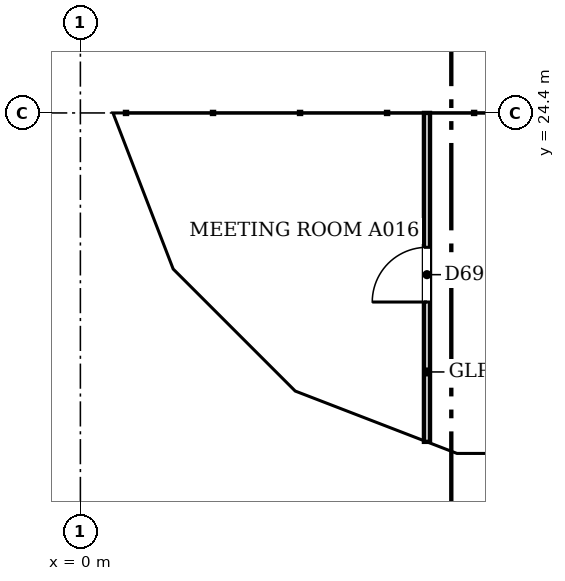
"""IFC4 building model, lengths in metres.
Left out: names, types, materials, properties, quantities, classifications, styles, units other than length and angle.
Written with IfcOpenShell. Run it as: python <this file> out.ifc"""

import sys

from ifc_helpers import new_model, si_unit, direction, frame, frame_2d, origin, place, context, subcontext, project, spatial, polyline, rectangle, outline, extrude, faceted_brep, source, transform, mapped, element, fill, save


model = new_model("IFC4")
c1 = context("Model", 3, precision=1e-05, world=origin(), true_north=direction((0.0, 1.0)))
c2 = subcontext(c1, "Body", "Model", "MODEL_VIEW")
j1 = project(units=[si_unit("LENGTHUNIT", "METRE"), si_unit("PLANEANGLEUNIT", "RADIAN")], contexts=[c1])
p1 = place(None, origin())
s1 = spatial("IfcSite", under=j1, at=p1, CompositionType="ELEMENT")
p2 = place(p1, origin())
s2 = spatial("IfcBuilding", under=s1, at=p2, CompositionType="ELEMENT")
p3 = place(p2, frame((0.0, 0.0, 185.8)))
s3 = spatial("IfcBuildingStorey", under=s2, at=p3, CompositionType="ELEMENT", Elevation=185.8)
m1 = source(origin(), c2, "Body", "Brep", [
    faceted_brep([(3.05, -0.25, 0.0), (6.053, -0.25, 3.8), (3.05, -0.25, 7.6), (0.0, -0.25, 3.8), (0.0, 0.25, 3.8), (3.05, 0.25, 7.6), (6.007, 0.25, 3.859), (6.007, 0.25, 3.741), (3.05, 0.25, 0.0), (6.053, 0.0, 3.8)], [[[0, 1, 2, 3]], [[4, 5, 6, 7, 8]], [[8, 7, 9, 1, 0]], [[6, 5, 2, 1, 9]], [[5, 4, 3, 2]], [[4, 8, 0, 3]], [[9, 7, 6]]]),
])
p4 = place(p3, frame((0.25, 30.5, -3.8), z_axis=(0.0, 0.0, 1.0), x_axis=(0.0, -1.0, 0.0)))
e1 = element("IfcWall", 1, at=p4, inside=s3, PredefinedType="SOLIDWALL", context=c2, shape_type="MappedRepresentation", body=[
    mapped(m1, transform((0.0, 0.0, 0.0), scale=1.0)),
])
m2 = source(origin(), c2, "Body", "SweptSolid", [
    extrude(outline(polyline([(3.049, 0.401), (5.735, 3.8), (3.049, 7.199), (0.321, 3.8), (3.049, 0.401)])), frame((0.0, 0.26, 0.0), z_axis=(0.0, -1.0, 0.0), x_axis=(1.0, 0.0, 0.0)), (0.0, 0.0, 1.0), 0.52),
])
p5 = place(p4, origin())
e2 = element("IfcOpeningElement", 2, at=p5, cuts=e1, PredefinedType="OPENING", context=c2, shape_type="MappedRepresentation", body=[
    mapped(m2, transform((0.0, 0.0, 0.0), scale=1.0)),
])
m3 = source(origin(), c2, "Body", "Brep", [
    faceted_brep([(2.95, -0.25, 0.0), (3.003, -0.25, 0.068), (3.003, -0.25, 7.532), (2.95, -0.25, 7.6), (0.0, -0.25, 3.8), (0.047, 0.25, 3.86), (2.898, 0.25, 7.532), (2.898, 0.25, 0.068), (0.047, 0.25, 3.74), (2.95, 0.0, 0.0), (2.95, 0.0, 7.6), (0.0, 0.0, 3.8)], [[[0, 1, 2, 3, 4]], [[5, 6, 7, 8]], [[1, 0, 9]], [[10, 3, 2]], [[6, 5, 11, 4, 3, 10]], [[8, 7, 9, 0, 4, 11]], [[8, 11, 5]], [[1, 9, 7, 6, 10, 2]]]),
])
p6 = place(p3, frame((0.25, 24.447, -3.8), z_axis=(0.0, 0.0, 1.0), x_axis=(0.35992665181, -0.932980602862, 0.0)))
e3 = element("IfcWall", 3, at=p6, inside=s3, PredefinedType="SOLIDWALL", context=c2, shape_type="MappedRepresentation", body=[
    mapped(m3, transform((0.0, 0.0, 0.0), scale=1.0)),
])
m4 = source(origin(), c2, "Body", "SweptSolid", [
    extrude(outline(polyline([(2.75, 6.935), (0.316, 3.8), (2.75, 0.665), (2.75, 6.935)])), frame((0.0, 0.26, 0.0), z_axis=(0.0, -1.0, 0.0), x_axis=(1.0, 0.0, 0.0)), (0.0, 0.0, 1.0), 0.52),
])
p7 = place(p6, origin())
e4 = element("IfcOpeningElement", 4, at=p7, cuts=e3, PredefinedType="OPENING", context=c2, shape_type="MappedRepresentation", body=[
    mapped(m4, transform((0.0, 0.0, 0.0), scale=1.0)),
])
m5 = source(origin(), c2, "Body", "Brep", [
    faceted_brep([(0.053, -0.25, 0.0), (2.997, -0.25, 3.8), (0.053, -0.25, 7.6), (0.0, -0.25, 7.532), (0.0, -0.25, 0.068), (0.106, 0.25, 7.532), (2.944, 0.25, 3.868), (2.944, 0.25, 3.732), (0.106, 0.25, 0.068), (2.997, 0.0, 3.8), (0.053, 0.0, 0.0), (0.053, 0.0, 7.6)], [[[0, 1, 2, 3, 4]], [[5, 6, 7, 8]], [[8, 7, 9, 1, 0, 10]], [[6, 5, 11, 2, 1, 9]], [[3, 2, 11]], [[10, 0, 4]], [[8, 10, 4, 3, 11, 5]], [[9, 7, 6]]]),
])
p8 = place(p3, frame((1.274, 21.731, -3.8), z_axis=(0.0, 0.0, 1.0), x_axis=(0.707147509625, -0.707066050402, 0.0)))
e5 = element("IfcWall", 5, at=p8, inside=s3, PredefinedType="SOLIDWALL", context=c2, shape_type="MappedRepresentation", body=[
    mapped(m5, transform((0.0, 0.0, 0.0), scale=1.0)),
])
m6 = source(origin(), c2, "Body", "SweptSolid", [
    extrude(outline(polyline([(0.253, 0.666), (2.681, 3.8), (0.253, 6.934), (0.253, 0.666)])), frame((0.0, 0.26, 0.0), z_axis=(0.0, -1.0, 0.0), x_axis=(1.0, 0.0, 0.0)), (0.0, 0.0, 1.0), 0.52),
])
p9 = place(p8, origin())
e6 = element("IfcOpeningElement", 6, at=p9, cuts=e5, PredefinedType="OPENING", context=c2, shape_type="MappedRepresentation", body=[
    mapped(m6, transform((0.0, 0.0, 0.0), scale=1.0)),
])
m7 = source(origin(), c2, "Body", "Brep", [
    faceted_brep([(2.95, -0.25, 0.0), (2.997, -0.25, 0.059), (2.997, -0.25, 7.541), (2.95, -0.25, 7.6), (0.0, -0.25, 3.8), (0.053, 0.25, 3.868), (2.904, 0.25, 7.54), (2.904, 0.25, 0.06), (0.053, 0.25, 3.732), (2.95, 0.0, 0.0), (2.95, 0.0, 7.6), (0.0, 0.0, 3.8)], [[[0, 1, 2, 3, 4]], [[5, 6, 7, 8]], [[1, 0, 9]], [[10, 3, 2]], [[6, 5, 11, 4, 3, 10]], [[8, 7, 9, 0, 4, 11]], [[8, 11, 5]], [[1, 9, 7, 6, 10, 2]]]),
])
p10 = place(p3, frame((3.394, 19.612, -3.8), z_axis=(0.0, 0.0, 1.0), x_axis=(0.932990326376, -0.359901446078, 0.0)))
e7 = element("IfcWall", 7, at=p10, inside=s3, PredefinedType="SOLIDWALL", context=c2, shape_type="MappedRepresentation", body=[
    mapped(m7, transform((0.0, 0.0, 0.0), scale=1.0)),
])
p11 = place(p10, origin())
e8 = element("IfcOpeningElement", 8, at=p11, cuts=e7, PredefinedType="OPENING", context=c2, shape_type="MappedRepresentation", body=[
    mapped(m4, transform((0.0, 0.0, 0.0), scale=1.0)),
])
m8 = source(origin(), c2, "Body", "Brep", [
    faceted_brep([(0.047, -0.25, 0.0), (3.05, -0.25, 3.8), (0.047, -0.25, 7.6), (0.0, -0.25, 7.54), (0.0, -0.25, 0.06), (0.093, 0.25, 7.541), (3.05, 0.25, 3.8), (0.093, 0.25, 0.059), (0.047, 0.0, 0.0), (0.047, 0.0, 7.6)], [[[0, 1, 2, 3, 4]], [[5, 6, 7]], [[7, 6, 1, 0, 8]], [[6, 5, 9, 2, 1]], [[3, 2, 9]], [[8, 0, 4]], [[7, 8, 4, 3, 9, 5]]]),
])
p12 = place(p3, frame((6.1, 18.55, -3.8), z_axis=(0.0, 0.0, 1.0), x_axis=(1.0, 0.0, 0.0)))
e9 = element("IfcWall", 9, at=p12, inside=s3, PredefinedType="SOLIDWALL", context=c2, shape_type="MappedRepresentation", body=[
    mapped(m8, transform((0.0, 0.0, 0.0), scale=1.0)),
])
m9 = source(origin(), c2, "Body", "SweptSolid", [
    extrude(outline(polyline([(0.247, 0.656), (2.731, 3.8), (0.247, 6.944), (0.247, 0.656)])), frame((0.0, 0.26, 0.0), z_axis=(0.0, -1.0, 0.0), x_axis=(1.0, 0.0, 0.0)), (0.0, 0.0, 1.0), 0.52),
])
p13 = place(p12, origin())
e10 = element("IfcOpeningElement", 10, at=p13, cuts=e9, PredefinedType="OPENING", context=c2, shape_type="MappedRepresentation", body=[
    mapped(m9, transform((0.0, 0.0, 0.0), scale=1.0)),
])
p14 = place(p2, frame((0.0, 0.0, 189.6)))
s4 = spatial("IfcBuildingStorey", under=s2, at=p14, CompositionType="ELEMENT", Elevation=189.6)
m10 = source(origin(), c2, "Body", "Brep", [
    faceted_brep([(3.003, -0.25, 0.0), (3.05, -0.25, 0.06), (3.05, -0.25, 7.54), (3.003, -0.25, 7.6), (0.0, -0.25, 3.8), (0.0, 0.25, 3.8), (2.957, 0.25, 7.541), (2.957, 0.25, 0.059), (3.003, 0.0, 0.0), (3.003, 0.0, 7.6)], [[[0, 1, 2, 3, 4]], [[5, 6, 7]], [[1, 0, 8]], [[9, 3, 2]], [[6, 5, 4, 3, 9]], [[5, 7, 8, 0, 4]], [[1, 8, 7, 6, 9, 2]]]),
])
p15 = place(p14, frame((0.25, 27.45, -3.8), z_axis=(0.0, 0.0, 1.0), x_axis=(0.0, -1.0, 0.0)))
e11 = element("IfcWall", 11, at=p15, inside=s4, PredefinedType="SOLIDWALL", context=c2, shape_type="MappedRepresentation", body=[
    mapped(m10, transform((0.0, 0.0, 0.0), scale=1.0)),
])
m11 = source(origin(), c2, "Body", "SweptSolid", [
    extrude(outline(polyline([(2.803, 6.944), (0.319, 3.8), (2.803, 0.656), (2.803, 6.944)])), frame((0.0, 0.26, 0.0), z_axis=(0.0, -1.0, 0.0), x_axis=(1.0, 0.0, 0.0)), (0.0, 0.0, 1.0), 0.52),
])
p16 = place(p15, origin())
e12 = element("IfcOpeningElement", 12, at=p16, cuts=e11, PredefinedType="OPENING", context=c2, shape_type="MappedRepresentation", body=[
    mapped(m11, transform((0.0, 0.0, 0.0), scale=1.0)),
])
m12 = source(origin(), c2, "Body", "Brep", [
    faceted_brep([(0.047, -0.25, 0.0), (2.997, -0.25, 3.8), (0.047, -0.25, 7.6), (0.0, -0.25, 7.541), (0.0, -0.25, 0.059), (0.093, 0.25, 7.54), (2.944, 0.25, 3.868), (2.944, 0.25, 3.732), (0.093, 0.25, 0.06), (2.997, 0.0, 3.8), (0.047, 0.0, 0.0), (0.047, 0.0, 7.6)], [[[0, 1, 2, 3, 4]], [[5, 6, 7, 8]], [[8, 7, 9, 1, 0, 10]], [[6, 5, 11, 2, 1, 9]], [[3, 2, 11]], [[10, 0, 4]], [[8, 10, 4, 3, 11, 5]], [[7, 6, 9]]]),
])
p17 = place(p14, frame((0.233, 24.49, -3.8), z_axis=(0.0, 0.0, 1.0), x_axis=(0.359901446078, -0.932990326376, 0.0)))
e13 = element("IfcWall", 13, at=p17, inside=s4, PredefinedType="SOLIDWALL", context=c2, shape_type="MappedRepresentation", body=[
    mapped(m12, transform((0.0, 0.0, 0.0), scale=1.0)),
])
m13 = source(origin(), c2, "Body", "SweptSolid", [
    extrude(outline(polyline([(0.247, 0.665), (2.681, 3.8), (0.247, 6.935), (0.247, 0.665)])), frame((0.0, 0.26, 0.0), z_axis=(0.0, -1.0, 0.0), x_axis=(1.0, 0.0, 0.0)), (0.0, 0.0, 1.0), 0.52),
])
p18 = place(p17, origin())
e14 = element("IfcOpeningElement", 14, at=p18, cuts=e13, PredefinedType="OPENING", context=c2, shape_type="MappedRepresentation", body=[
    mapped(m13, transform((0.0, 0.0, 0.0), scale=1.0)),
])
m14 = source(origin(), c2, "Body", "Brep", [
    faceted_brep([(2.944, -0.25, 0.0), (2.997, -0.25, 0.068), (2.997, -0.25, 7.532), (2.944, -0.25, 7.6), (0.0, -0.25, 3.8), (0.053, 0.25, 3.868), (2.891, 0.25, 7.532), (2.891, 0.25, 0.068), (0.053, 0.25, 3.732), (2.944, 0.0, 0.0), (2.944, 0.0, 7.6), (0.0, 0.0, 3.8)], [[[0, 1, 2, 3, 4]], [[5, 6, 7, 8]], [[1, 0, 9]], [[10, 3, 2]], [[6, 5, 11, 4, 3, 10]], [[8, 7, 9, 0, 4, 11]], [[8, 11, 5]], [[1, 9, 7, 6, 10, 2]]]),
])
p19 = place(p14, frame((1.312, 21.694, -3.8), z_axis=(0.0, 0.0, 1.0), x_axis=(0.707066050402, -0.707147509625, 0.0)))
e15 = element("IfcWall", 15, at=p19, inside=s4, PredefinedType="SOLIDWALL", context=c2, shape_type="MappedRepresentation", body=[
    mapped(m14, transform((0.0, 0.0, 0.0), scale=1.0)),
])
m15 = source(origin(), c2, "Body", "SweptSolid", [
    extrude(outline(polyline([(2.744, 6.934), (0.316, 3.8), (2.744, 0.666), (2.744, 6.934)])), frame((0.0, 0.26, 0.0), z_axis=(0.0, -1.0, 0.0), x_axis=(1.0, 0.0, 0.0)), (0.0, 0.0, 1.0), 0.52),
])
p20 = place(p19, origin())
e16 = element("IfcOpeningElement", 16, at=p20, cuts=e15, PredefinedType="OPENING", context=c2, shape_type="MappedRepresentation", body=[
    mapped(m15, transform((0.0, 0.0, 0.0), scale=1.0)),
])
m16 = source(origin(), c2, "Body", "Brep", [
    faceted_brep([(0.053, -0.25, 0.0), (3.003, -0.25, 3.8), (0.053, -0.25, 7.6), (0.0, -0.25, 7.531), (0.0, -0.25, 0.068), (0.106, 0.25, 7.532), (2.957, 0.25, 3.86), (2.957, 0.25, 3.74), (0.106, 0.25, 0.068), (3.003, 0.0, 3.8), (0.053, 0.0, 0.0), (0.053, 0.0, 7.6)], [[[0, 1, 2, 3, 4]], [[5, 6, 7, 8]], [[8, 7, 9, 1, 0, 10]], [[6, 5, 11, 2, 1, 9]], [[3, 2, 11]], [[10, 0, 4]], [[8, 10, 4, 3, 11, 5]], [[7, 6, 9]]]),
])
p21 = place(p14, frame((3.344, 19.631, -3.8), z_axis=(0.0, 0.0, 1.0), x_axis=(0.933007896601, -0.359855894603, 0.0)))
e17 = element("IfcWall", 17, at=p21, inside=s4, PredefinedType="SOLIDWALL", context=c2, shape_type="MappedRepresentation", body=[
    mapped(m16, transform((0.0, 0.0, 0.0), scale=1.0)),
])
m17 = source(origin(), c2, "Body", "SweptSolid", [
    extrude(outline(polyline([(0.253, 0.665), (2.687, 3.8), (0.253, 6.935), (0.253, 0.665)])), frame((0.0, 0.26, 0.0), z_axis=(0.0, -1.0, 0.0), x_axis=(1.0, 0.0, 0.0)), (0.0, 0.0, 1.0), 0.52),
])
p22 = place(p21, origin())
e18 = element("IfcOpeningElement", 18, at=p22, cuts=e17, PredefinedType="OPENING", context=c2, shape_type="MappedRepresentation", body=[
    mapped(m17, transform((0.0, 0.0, 0.0), scale=1.0)),
])
m18 = source(origin(), c2, "Body", "Brep", [
    faceted_brep([(3.003, -0.25, 0.0), (6.053, -0.25, 3.8), (3.003, -0.25, 7.6), (0.0, -0.25, 3.8), (0.047, 0.25, 3.859), (3.003, 0.25, 7.6), (6.053, 0.25, 3.8), (3.003, 0.25, 0.0), (0.047, 0.25, 3.741), (0.0, 0.0, 3.8)], [[[0, 1, 2, 3]], [[4, 5, 6, 7, 8]], [[7, 6, 1, 0]], [[6, 5, 2, 1]], [[5, 4, 9, 3, 2]], [[8, 7, 0, 3, 9]], [[8, 9, 4]]]),
])
p23 = place(p14, frame((6.146, 18.55, -3.8), z_axis=(0.0, 0.0, 1.0), x_axis=(1.0, 0.0, 0.0)))
e19 = element("IfcWall", 19, at=p23, inside=s4, PredefinedType="SOLIDWALL", context=c2, shape_type="MappedRepresentation", body=[
    mapped(m18, transform((0.0, 0.0, 0.0), scale=1.0)),
])
m19 = source(origin(), c2, "Body", "SweptSolid", [
    extrude(outline(polyline([(3.005, 0.401), (5.733, 3.8), (3.005, 7.199), (0.319, 3.8), (3.005, 0.401)])), frame((0.0, 0.26, 0.0), z_axis=(0.0, -1.0, 0.0), x_axis=(1.0, 0.0, 0.0)), (0.0, 0.0, 1.0), 0.52),
])
p24 = place(p23, origin())
e20 = element("IfcOpeningElement", 20, at=p24, cuts=e19, PredefinedType="OPENING", context=c2, shape_type="MappedRepresentation", body=[
    mapped(m19, transform((0.0, 0.0, 0.0), scale=1.0)),
])
p25 = place(p3, frame((5.7, 18.99, 0.0), z_axis=(0.0, 0.0, 1.0), x_axis=(0.0, 1.0, 0.0)))
e21 = element("IfcWall", 21, at=p25, inside=s3, PredefinedType="PARTITIONING", context=c2, shape_type="SweptSolid", body=[
    extrude(rectangle(XDim=5.41, YDim=0.1, at=frame_2d((2.705, 0.0))), origin(), (0.0, 0.0, 1.0), 3.067),
])
m20 = source(origin(), c2, "Body", "SweptSolid", [
    extrude(rectangle(XDim=0.9, YDim=2.1, at=frame_2d((0.45, 1.05))), frame((0.0, 0.06, 0.0), z_axis=(0.0, -1.0, 0.0), x_axis=(1.0, 0.0, 0.0)), (0.0, 0.0, 1.0), 0.12),
])
p26 = place(p25, frame((2.3, 0.0, 0.0)))
e22 = element("IfcOpeningElement", 22, at=p26, cuts=e21, PredefinedType="OPENING", context=c2, shape_type="MappedRepresentation", body=[
    mapped(m20, transform((0.0, 0.0, 0.0), scale=1.0)),
])
m21 = source(origin(), c2, "Body", "SweptSolid", [
    extrude(rectangle(XDim=0.9, YDim=2.1, at=frame_2d((0.45, 1.05))), frame((0.0, 0.025, 0.0), z_axis=(0.0, -1.0, 0.0), x_axis=(1.0, 0.0, 0.0)), (0.0, 0.0, 1.0), 0.05),
])
p27 = place(p26, origin())
e23 = element("IfcDoor", 23, at=p27, inside=s3, OperationType="SINGLE_SWING_LEFT", PredefinedType="DOOR", context=c2, shape_type="MappedRepresentation", body=[
    mapped(m21, transform((0.0, 0.0, 0.0), scale=1.0)),
])
fill(e22, e23)
save(model, sys.argv[1])
